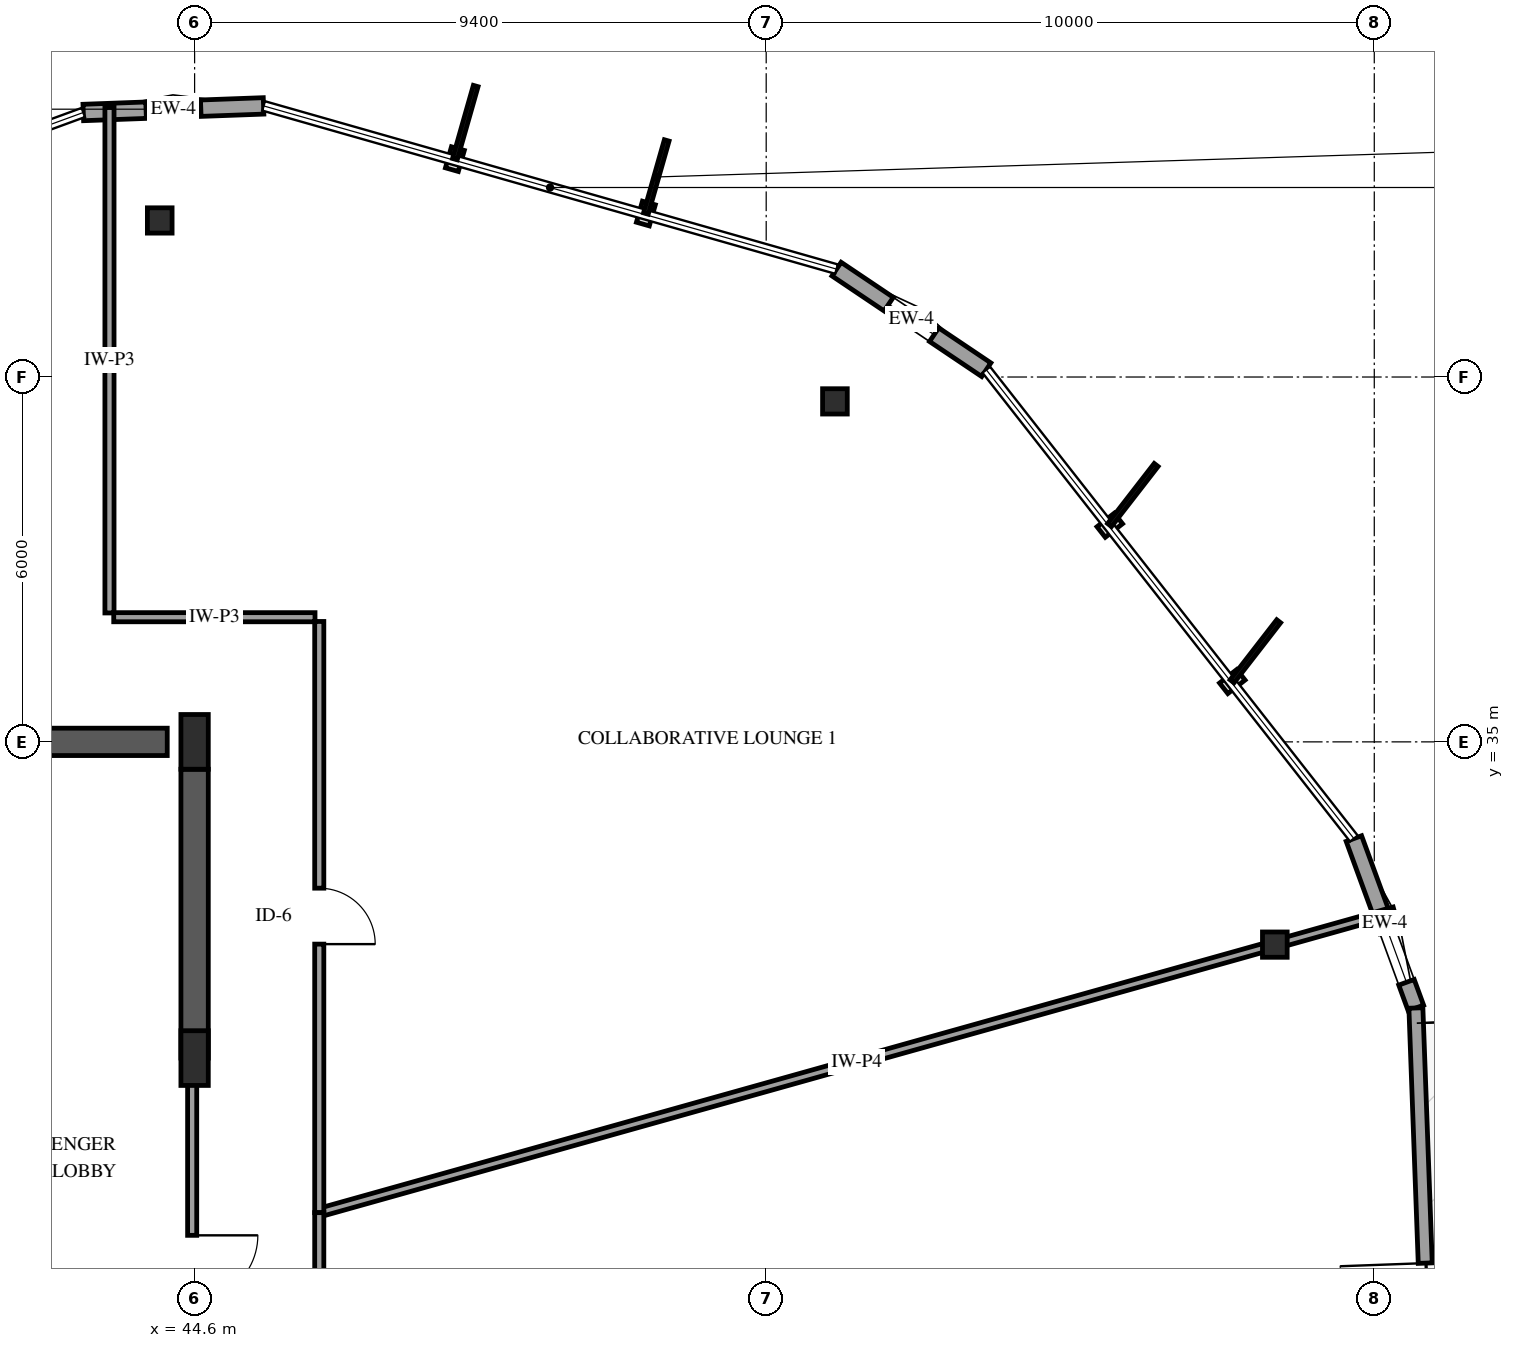
"""IFC4 building model, lengths in metres.
Left out: names, types, materials, properties, quantities, classifications, styles, units other than length and angle.
Written with IfcOpenShell. Run it as: python <this file> out.ifc"""

import sys

from ifc_helpers import new_model, si_unit, direction, frame, frame_2d, origin, origin_2d, place, context, subcontext, project, spatial, rectangle, i_section, extrude, element, fill, save


model = new_model("IFC4")
c1 = context("Model", 3, precision=1e-05, world=origin(), true_north=direction((0.0, 1.0)))
c2 = subcontext(c1, "Body", "Model", "MODEL_VIEW")
j1 = project(units=[si_unit("LENGTHUNIT", "METRE"), si_unit("PLANEANGLEUNIT", "RADIAN")], contexts=[c1])
p1 = place(None, origin())
s1 = spatial("IfcSite", under=j1, at=p1, CompositionType="ELEMENT")
p2 = place(p1, origin())
s2 = spatial("IfcBuilding", under=s1, at=p2, CompositionType="ELEMENT")
p3 = place(p2, frame((0.0, 0.0, 237.4)))
s3 = spatial("IfcBuildingStorey", under=s2, at=p3, CompositionType="ELEMENT", Elevation=237.4)
p4 = place(p3, frame((41.3, 35.0, 0.0), z_axis=(0.0, 0.0, 1.0), x_axis=(1.0, 0.0, 0.0)))
e1 = element("IfcWall", 1, at=p4, inside=s3, PredefinedType="SHEAR", context=c2, shape_type="SweptSolid", body=[
    extrude(rectangle(XDim=2.85, YDim=0.45, at=frame_2d((1.425, 0.0))), origin(), (0.0, 0.0, 1.0), 5.1),
])
p5 = place(p3, frame((44.6, 29.8, 0.0), z_axis=(0.0, 0.0, 1.0), x_axis=(0.0, 1.0, 0.0)))
e2 = element("IfcWall", 2, at=p5, inside=s3, PredefinedType="SHEAR", context=c2, shape_type="SweptSolid", body=[
    extrude(rectangle(XDim=4.75, YDim=0.45, at=frame_2d((2.375, 0.0))), origin(), (0.0, 0.0, 1.0), 5.1),
])
for number, where, z_axis, x_axis in (
    (3, (44.6, 29.8, 0.0), (0.0, 0.0, 1.0), (1.0, 0.0, 0.0)),
    (4, (44.6, 35.0, 0.0), (0.0, 0.0, 1.0), (1.0, 0.0, 0.0)),
):
    element("IfcColumn", number, at=place(p3, frame(where, z_axis=z_axis, x_axis=x_axis)), inside=s3, PredefinedType="PILASTER", context=c2, shape_type="SweptSolid", body=[
        extrude(rectangle(XDim=0.45, YDim=0.9, at=origin_2d()), origin(), (0.0, 0.0, 1.0), 4.8),
    ])
for number, where, z_axis, x_axis in (
    (5, (62.365, 31.666, 0.0), (0.0, 0.0, 1.0), (1.0, 0.0, 0.0)),
    (6, (55.13, 40.599, 0.0), (0.0, 0.0, 1.0), (1.0, 0.0, 0.0)),
    (7, (44.027, 43.574, 0.0), (0.0, 0.0, 1.0), (1.0, 0.0, 0.0)),
):
    element("IfcColumn", number, at=place(p3, frame(where, z_axis=z_axis, x_axis=x_axis)), inside=s3, PredefinedType="COLUMN", context=c2, shape_type="SweptSolid", body=[
        extrude(i_section(OverallWidth=0.406, OverallDepth=0.416, WebThickness=0.03, FlangeThickness=0.048, FilletRadius=0.038, at=origin_2d()), origin(), (0.0, 0.0, 1.0), 4.8),
    ])
p6 = place(p3, frame((45.734, 45.459, 0.0), z_axis=(0.0, 0.0, 1.0), x_axis=(-0.999329187927, -0.036622044686, 0.0)))
e8 = element("IfcWall", 8, at=p6, inside=s3, PredefinedType="SOLIDWALL", context=c2, shape_type="SweptSolid", body=[
    extrude(rectangle(XDim=2.967, YDim=0.27, at=frame_2d((1.483, 0.0))), origin(), (0.0, 0.0, 1.0), 4.179),
])
p7 = place(p6, frame((1.033, 0.0, 0.75)))
e9 = element("IfcOpeningElement", 9, at=p7, cuts=e8, PredefinedType="OPENING", context=c2, shape_type="SweptSolid", body=[
    extrude(rectangle(XDim=0.9, YDim=1.5, at=frame_2d((0.45, 0.75))), frame((0.0, 0.145, 0.0), z_axis=(0.0, -1.0, 0.0), x_axis=(1.0, 0.0, 0.0)), (0.0, 0.0, 1.0), 0.29),
])
p8 = place(p3, frame((64.684, 30.624, 0.0), z_axis=(0.0, 0.0, 1.0), x_axis=(-0.343572680233, 0.939126090255, 0.0)))
e10 = element("IfcWall", 10, at=p8, inside=s3, PredefinedType="SOLIDWALL", context=c2, shape_type="SweptSolid", body=[
    extrude(rectangle(XDim=2.967, YDim=0.27, at=frame_2d((1.483, 0.0))), origin(), (0.0, 0.0, 1.0), 4.179),
])
p9 = place(p8, frame((0.45, 0.0, 0.75)))
e11 = element("IfcOpeningElement", 11, at=p9, cuts=e10, PredefinedType="OPENING", context=c2, shape_type="SweptSolid", body=[
    extrude(rectangle(XDim=0.9, YDim=1.5, at=frame_2d((0.45, 0.75))), frame((0.0, 0.145, 0.0), z_axis=(0.0, -1.0, 0.0), x_axis=(1.0, 0.0, 0.0)), (0.0, 0.0, 1.0), 0.29),
])
p10 = place(p3, frame((65.043, 20.833, 0.0), z_axis=(0.0, 0.0, 1.0), x_axis=(-0.036654983518, 0.999327980286, 0.0)))
e12 = element("IfcWall", 12, at=p10, inside=s3, PredefinedType="SOLIDWALL", context=c2, shape_type="SweptSolid", body=[
    extrude(rectangle(XDim=9.798, YDim=0.23, at=frame_2d((4.899, 0.0))), origin(), (0.0, 0.0, 1.0), 4.179),
])
p11 = place(p10, frame((4.199, 0.0, 0.0)))
e13 = element("IfcOpeningElement", 13, at=p11, cuts=e12, PredefinedType="OPENING", context=c2, shape_type="SweptSolid", body=[
    extrude(rectangle(XDim=1.4, YDim=2.2, at=frame_2d((0.7, 1.1))), frame((0.0, 0.125, 0.0), z_axis=(0.0, -1.0, 0.0), x_axis=(1.0, 0.0, 0.0)), (0.0, 0.0, 1.0), 0.25),
])
p12 = place(p3, frame((57.619, 41.12, 0.0), z_axis=(0.0, 0.0, 1.0), x_axis=(-0.830006141752, 0.557754251131, 0.0)))
e14 = element("IfcWall", 14, at=p12, inside=s3, PredefinedType="SOLIDWALL", context=c2, shape_type="SweptSolid", body=[
    extrude(rectangle(XDim=2.967, YDim=0.27, at=frame_2d((1.483, 0.0))), origin(), (0.0, 0.0, 1.0), 4.179),
])
p13 = place(p12, frame((1.033, 0.0, 0.75)))
e15 = element("IfcOpeningElement", 15, at=p13, cuts=e14, PredefinedType="OPENING", context=c2, shape_type="SweptSolid", body=[
    extrude(rectangle(XDim=0.9, YDim=1.5, at=frame_2d((0.45, 0.75))), frame((0.0, 0.145, 0.0), z_axis=(0.0, -1.0, 0.0), x_axis=(1.0, 0.0, 0.0)), (0.0, 0.0, 1.0), 0.29),
])
p14 = place(p3, frame((64.329, 32.217, 0.0), z_axis=(0.0, 0.0, 1.0), x_axis=(-0.962839357713, -0.270074751206, 0.0)))
e16 = element("IfcWall", 16, at=p14, inside=s3, PredefinedType="PARTITIONING", context=c2, shape_type="SweptSolid", body=[
    extrude(rectangle(XDim=18.362, YDim=0.14, at=frame_2d((9.181, 0.0))), origin(), (0.0, 0.0, 1.0), 2.87),
])
p15 = place(p3, frame((46.65, 36.98, 0.0), z_axis=(0.0, 0.0, 1.0), x_axis=(0.0, -1.0, 0.0)))
e17 = element("IfcWall", 17, at=p15, inside=s3, PredefinedType="PARTITIONING", context=c2, shape_type="SweptSolid", body=[
    extrude(rectangle(XDim=9.722, YDim=0.15, at=frame_2d((4.861, 0.0))), origin(), (0.0, 0.0, 1.0), 4.8),
])
p16 = place(p15, frame((4.386, 0.0, 0.0)))
e18 = element("IfcOpeningElement", 18, at=p16, cuts=e17, PredefinedType="OPENING", context=c2, shape_type="SweptSolid", body=[
    extrude(rectangle(XDim=0.92, YDim=2.12, at=frame_2d((0.46, 1.06))), frame((0.0, 0.085, 0.0), z_axis=(0.0, -1.0, 0.0), x_axis=(1.0, 0.0, 0.0)), (0.0, 0.0, 1.0), 0.17),
])
p17 = place(p3, frame((46.65, 27.258, 0.0), z_axis=(0.0, 0.0, 1.0), x_axis=(0.0, -1.0, 0.0)))
e19 = element("IfcWall", 19, at=p17, inside=s3, PredefinedType="PARTITIONING", context=c2, shape_type="SweptSolid", body=[
    extrude(rectangle(XDim=8.685, YDim=0.15, at=frame_2d((4.343, 0.0))), origin(), (0.0, 0.0, 1.0), 4.8),
])
p18 = place(p17, frame((3.867, 0.0, 0.0)))
e20 = element("IfcOpeningElement", 20, at=p18, cuts=e19, PredefinedType="OPENING", context=c2, shape_type="SweptSolid", body=[
    extrude(rectangle(XDim=0.92, YDim=2.12, at=frame_2d((0.46, 1.06))), frame((0.0, 0.085, 0.0), z_axis=(0.0, -1.0, 0.0), x_axis=(1.0, 0.0, 0.0)), (0.0, 0.0, 1.0), 0.17),
])
p19 = place(p3, frame((43.2, 45.434, 0.0), z_axis=(0.0, 0.0, 1.0), x_axis=(0.0, -1.0, 0.0)))
e21 = element("IfcWall", 21, at=p19, inside=s3, PredefinedType="PARTITIONING", context=c2, shape_type="SweptSolid", body=[
    extrude(rectangle(XDim=8.314, YDim=0.15, at=frame_2d((4.157, 0.0))), origin(), (0.0, 0.0, 1.0), 3.09),
])
p20 = place(p3, frame((44.56, 29.8, 0.0), z_axis=(0.0, 0.0, 1.0), x_axis=(0.0, -1.0, 0.0)))
e22 = element("IfcWall", 22, at=p20, inside=s3, PredefinedType="PARTITIONING", context=c2, shape_type="SweptSolid", body=[
    extrude(rectangle(XDim=6.91, YDim=0.15, at=frame_2d((3.455, 0.0))), origin(), (0.0, 0.0, 1.0), 3.84),
])
p21 = place(p20, frame((2.915, 0.0, 0.0)))
e23 = element("IfcOpeningElement", 23, at=p21, cuts=e22, PredefinedType="OPENING", context=c2, shape_type="SweptSolid", body=[
    extrude(rectangle(XDim=1.08, YDim=2.15, at=frame_2d((0.54, 1.075))), frame((0.0, 0.085, 0.0), z_axis=(0.0, -1.0, 0.0), x_axis=(1.0, 0.0, 0.0)), (0.0, 0.0, 1.0), 0.17),
])
p22 = place(p3, frame((43.27, 37.05, 0.0), z_axis=(0.0, 0.0, 1.0), x_axis=(1.0, 0.0, 0.0)))
e24 = element("IfcWall", 24, at=p22, inside=s3, PredefinedType="PARTITIONING", context=c2, shape_type="SweptSolid", body=[
    extrude(rectangle(XDim=3.31, YDim=0.15, at=frame_2d((1.655, 0.0))), origin(), (0.0, 0.0, 1.0), 4.8),
])
p23 = place(p7, origin())
e25 = element("IfcWindow", 25, at=p23, inside=s3, PartitioningType="SINGLE_PANEL", PredefinedType="WINDOW", context=c2, shape_type="SweptSolid", body=[
    extrude(rectangle(XDim=0.9, YDim=1.5, at=frame_2d((0.45, 0.75))), frame((0.0, 0.03, 0.0), z_axis=(0.0, -1.0, 0.0), x_axis=(1.0, 0.0, 0.0)), (0.0, 0.0, 1.0), 0.06),
])
fill(e9, e25)
p24 = place(p9, origin())
e26 = element("IfcWindow", 26, at=p24, inside=s3, PartitioningType="SINGLE_PANEL", PredefinedType="WINDOW", context=c2, shape_type="SweptSolid", body=[
    extrude(rectangle(XDim=0.9, YDim=1.5, at=frame_2d((0.45, 0.75))), frame((0.0, 0.03, 0.0), z_axis=(0.0, -1.0, 0.0), x_axis=(1.0, 0.0, 0.0)), (0.0, 0.0, 1.0), 0.06),
])
fill(e11, e26)
p25 = place(p11, origin())
e27 = element("IfcDoor", 27, at=p25, inside=s3, OperationType="SINGLE_SWING_RIGHT", PredefinedType="DOOR", context=c2, shape_type="SweptSolid", body=[
    extrude(rectangle(XDim=1.4, YDim=2.2, at=frame_2d((0.7, 1.1))), frame((0.0, 0.025, 0.0), z_axis=(0.0, -1.0, 0.0), x_axis=(1.0, 0.0, 0.0)), (0.0, 0.0, 1.0), 0.05),
])
fill(e13, e27)
p26 = place(p13, origin())
e28 = element("IfcWindow", 28, at=p26, inside=s3, PartitioningType="SINGLE_PANEL", PredefinedType="WINDOW", context=c2, shape_type="SweptSolid", body=[
    extrude(rectangle(XDim=0.9, YDim=1.5, at=frame_2d((0.45, 0.75))), frame((0.0, 0.03, 0.0), z_axis=(0.0, -1.0, 0.0), x_axis=(1.0, 0.0, 0.0)), (0.0, 0.0, 1.0), 0.06),
])
fill(e15, e28)
p27 = place(p16, origin())
e29 = element("IfcDoor", 29, at=p27, inside=s3, OperationType="SINGLE_SWING_RIGHT", PredefinedType="DOOR", context=c2, shape_type="SweptSolid", body=[
    extrude(rectangle(XDim=0.92, YDim=2.12, at=frame_2d((0.46, 1.06))), frame((0.0, 0.025, 0.0), z_axis=(0.0, -1.0, 0.0), x_axis=(1.0, 0.0, 0.0)), (0.0, 0.0, 1.0), 0.05),
])
fill(e18, e29)
p28 = place(p21, origin())
e30 = element("IfcDoor", 30, at=p28, inside=s3, OperationType="SINGLE_SWING_LEFT", PredefinedType="DOOR", context=c2, shape_type="SweptSolid", body=[
    extrude(rectangle(XDim=1.08, YDim=2.15, at=frame_2d((0.54, 1.075))), frame((0.0, 0.025, 0.0), z_axis=(0.0, -1.0, 0.0), x_axis=(1.0, 0.0, 0.0)), (0.0, 0.0, 1.0), 0.05),
])
fill(e23, e30)
save(model, sys.argv[1])
